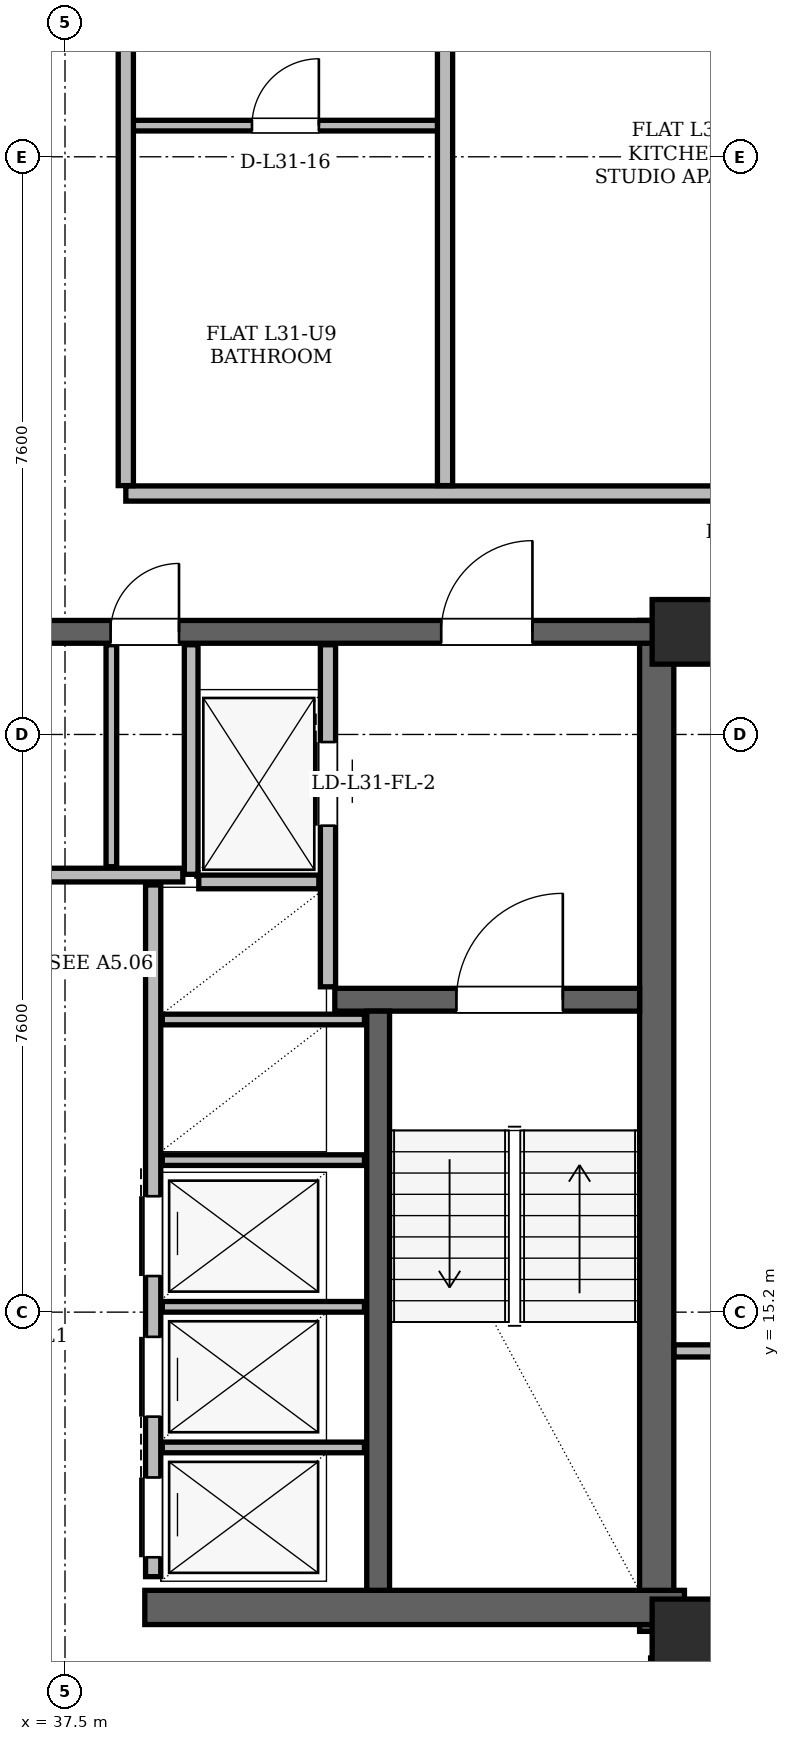
"""IFC4 building model, lengths in metres.
Left out: names, types, materials, properties, quantities, classifications, styles, units other than length and angle.
Written with IfcOpenShell. Run it as: python <this file> out.ifc"""

import sys

from ifc_helpers import new_model, si_unit, direction, frame, frame_2d, origin, origin_2d, place, context, subcontext, project, spatial, rectangle, hollow_rectangle, extrude, element, fill, save


model = new_model("IFC4")
c1 = context("Model", 3, precision=1e-05, world=origin(), true_north=direction((0.0, 1.0)))
c2 = subcontext(c1, "Body", "Model", "MODEL_VIEW")
j1 = project(units=[si_unit("LENGTHUNIT", "METRE"), si_unit("PLANEANGLEUNIT", "RADIAN")], contexts=[c1])
p1 = place(None, origin())
s1 = spatial("IfcSite", under=j1, at=p1, CompositionType="ELEMENT")
p2 = place(p1, origin())
s2 = spatial("IfcBuilding", under=s1, at=p2, CompositionType="ELEMENT")
p3 = place(p2, frame((0.0, 0.0, 119.4)))
s3 = spatial("IfcBuildingStorey", under=s2, at=p3, CompositionType="ELEMENT", Elevation=119.4)
for number, where, z_axis, x_axis in (
    (1, (45.65, 11.0, 0.0), (0.0, 0.0, 1.0), (1.0, 0.0, 0.0)),
    (2, (45.65, 24.15, 0.0), (0.0, 0.0, 1.0), (1.0, 0.0, 0.0)),
):
    element("IfcColumn", number, at=place(p3, frame(where, z_axis=z_axis, x_axis=x_axis)), inside=s3, PredefinedType="COLUMN", context=c2, shape_type="SweptSolid", body=[
        extrude(hollow_rectangle(XDim=0.85, YDim=0.85, WallThickness=0.07, at=origin_2d()), origin(), (0.0, 0.0, 1.0), 3.6),
    ])
p4 = place(p3, frame((45.285, 11.0, 0.0), z_axis=(0.0, 0.0, 1.0), x_axis=(0.0, 1.0, 0.0)))
e3 = element("IfcWall", 3, at=p4, inside=s3, PredefinedType="SHEAR", context=c2, shape_type="SweptSolid", body=[
    extrude(rectangle(XDim=13.3, YDim=0.45, at=frame_2d((6.65, 0.0))), origin(), (0.0, 0.0, 1.0), 3.36),
])
p5 = place(p3, frame((38.55, 11.315, 0.0), z_axis=(0.0, 0.0, 1.0), x_axis=(1.0, 0.0, 0.0)))
e4 = element("IfcWall", 4, at=p5, inside=s3, PredefinedType="SHEAR", context=c2, shape_type="SweptSolid", body=[
    extrude(rectangle(XDim=7.1, YDim=0.45, at=frame_2d((3.55, 0.0))), origin(), (0.0, 0.0, 1.0), 3.36),
])
p6 = place(p3, frame((29.65, 24.15, 0.0), z_axis=(0.0, 0.0, 1.0), x_axis=(1.0, 0.0, 0.0)))
e5 = element("IfcWall", 5, at=p6, inside=s3, PredefinedType="SHEAR", context=c2, shape_type="SweptSolid", body=[
    extrude(rectangle(XDim=15.7, YDim=0.3, at=frame_2d((7.85, 0.0))), origin(), (0.0, 0.0, 1.0), 3.36),
])
p7 = place(p6, frame((1.7, 0.0, 0.0)))
e6 = element("IfcOpeningElement", 6, at=p7, cuts=e5, PredefinedType="OPENING", context=c2, shape_type="SweptSolid", body=[
    extrude(rectangle(XDim=1.2, YDim=2.2, at=frame_2d((0.6, 1.1))), frame((0.0, 0.15, 0.0), z_axis=(0.0, -1.0, 0.0), x_axis=(1.0, 0.0, 0.0)), (0.0, 0.0, 1.0), 0.3),
])
p8 = place(p6, frame((12.8, 0.0, 0.0)))
e7 = element("IfcOpeningElement", 7, at=p8, cuts=e5, PredefinedType="OPENING", context=c2, shape_type="SweptSolid", body=[
    extrude(rectangle(XDim=1.2, YDim=2.2, at=frame_2d((0.6, 1.1))), frame((0.0, 0.15, 0.0), z_axis=(0.0, -1.0, 0.0), x_axis=(1.0, 0.0, 0.0)), (0.0, 0.0, 1.0), 0.3),
])
p9 = place(p6, frame((6.55, 0.0, 0.0)))
e8 = element("IfcOpeningElement", 8, at=p9, cuts=e5, PredefinedType="OPENING", context=c2, shape_type="SweptSolid", body=[
    extrude(rectangle(XDim=0.9, YDim=2.05, at=frame_2d((0.45, 1.025))), frame((0.0, 0.15, 0.0), z_axis=(0.0, -1.0, 0.0), x_axis=(1.0, 0.0, 0.0)), (0.0, 0.0, 1.0), 0.3),
])
p10 = place(p6, frame((8.45, 0.0, 0.0)))
e9 = element("IfcOpeningElement", 9, at=p10, cuts=e5, PredefinedType="OPENING", context=c2, shape_type="SweptSolid", body=[
    extrude(rectangle(XDim=0.9, YDim=2.05, at=frame_2d((0.45, 1.025))), frame((0.0, 0.15, 0.0), z_axis=(0.0, -1.0, 0.0), x_axis=(1.0, 0.0, 0.0)), (0.0, 0.0, 1.0), 0.3),
])
p11 = place(p3, frame((41.05, 19.31, 0.0), z_axis=(0.0, 0.0, 1.0), x_axis=(1.0, 0.0, 0.0)))
e10 = element("IfcWall", 10, at=p11, inside=s3, PredefinedType="SHEAR", context=c2, shape_type="SweptSolid", body=[
    extrude(rectangle(XDim=4.01, YDim=0.3, at=frame_2d((2.005, 0.0))), origin(), (0.0, 0.0, 1.0), 3.36),
])
p12 = place(p11, frame((1.6, 0.0, 0.0)))
e11 = element("IfcOpeningElement", 11, at=p12, cuts=e10, PredefinedType="OPENING", context=c2, shape_type="SweptSolid", body=[
    extrude(rectangle(XDim=1.4, YDim=2.2, at=frame_2d((0.7, 1.1))), frame((0.0, 0.15, 0.0), z_axis=(0.0, -1.0, 0.0), x_axis=(1.0, 0.0, 0.0)), (0.0, 0.0, 1.0), 0.3),
])
p13 = place(p3, frame((41.62, 11.54, 0.0), z_axis=(0.0, 0.0, 1.0), x_axis=(0.0, 1.0, 0.0)))
e12 = element("IfcWall", 12, at=p13, inside=s3, PredefinedType="SHEAR", context=c2, shape_type="SweptSolid", body=[
    extrude(rectangle(XDim=7.62, YDim=0.3, at=frame_2d((3.81, 0.0))), origin(), (0.0, 0.0, 1.0), 3.36),
])
p14 = place(p3, frame((60.417, 13.181, 0.0), z_axis=(0.0, 0.0, 1.0), x_axis=(-0.499998569178, 0.866026229868, 0.0)))
e13 = element("IfcWall", 13, at=p14, inside=s3, PredefinedType="SOLIDWALL", context=c2, shape_type="SweptSolid", body=[
    extrude(rectangle(XDim=34.901, YDim=0.34, at=frame_2d((17.451, 0.0))), origin(), (0.0, 0.0, 1.0), 2.578),
])
p15 = place(p14, frame((6.369, 0.0, 0.0)))
e14 = element("IfcOpeningElement", 14, at=p15, cuts=e13, PredefinedType="OPENING", context=c2, shape_type="SweptSolid", body=[
    extrude(rectangle(XDim=1.5, YDim=2.2, at=frame_2d((0.75, 1.1))), frame((0.0, 0.17, 0.0), z_axis=(0.0, -1.0, 0.0), x_axis=(1.0, 0.0, 0.0)), (0.0, 0.0, 1.0), 0.34),
])
p16 = place(p14, frame((25.367, 0.0, 0.0)))
e15 = element("IfcOpeningElement", 15, at=p16, cuts=e13, PredefinedType="OPENING", context=c2, shape_type="SweptSolid", body=[
    extrude(rectangle(XDim=1.5, YDim=2.2, at=frame_2d((0.75, 1.1))), frame((0.0, 0.17, 0.0), z_axis=(0.0, -1.0, 0.0), x_axis=(1.0, 0.0, 0.0)), (0.0, 0.0, 1.0), 0.34),
])
p17 = place(p14, frame((3.309, 0.0, 0.85)))
e16 = element("IfcOpeningElement", 16, at=p17, cuts=e13, PredefinedType="OPENING", context=c2, shape_type="SweptSolid", body=[
    extrude(rectangle(XDim=1.2, YDim=1.48, at=frame_2d((0.6, 0.74))), frame((0.0, 0.17, 0.0), z_axis=(0.0, -1.0, 0.0), x_axis=(1.0, 0.0, 0.0)), (0.0, 0.0, 1.0), 0.34),
])
p18 = place(p14, frame((11.346, 0.0, 0.85)))
e17 = element("IfcOpeningElement", 17, at=p18, cuts=e13, PredefinedType="OPENING", context=c2, shape_type="SweptSolid", body=[
    extrude(rectangle(XDim=1.2, YDim=1.48, at=frame_2d((0.6, 0.74))), frame((0.0, 0.17, 0.0), z_axis=(0.0, -1.0, 0.0), x_axis=(1.0, 0.0, 0.0)), (0.0, 0.0, 1.0), 0.34),
])
p19 = place(p14, frame((32.719, 0.0, 0.85)))
e18 = element("IfcOpeningElement", 18, at=p19, cuts=e13, PredefinedType="OPENING", context=c2, shape_type="SweptSolid", body=[
    extrude(rectangle(XDim=1.2, YDim=1.48, at=frame_2d((0.6, 0.74))), frame((0.0, 0.17, 0.0), z_axis=(0.0, -1.0, 0.0), x_axis=(1.0, 0.0, 0.0)), (0.0, 0.0, 1.0), 0.34),
])
p20 = place(p14, frame((14.549, 0.0, 0.85)))
e19 = element("IfcOpeningElement", 19, at=p20, cuts=e13, PredefinedType="OPENING", context=c2, shape_type="SweptSolid", body=[
    extrude(rectangle(XDim=2.5, YDim=1.618, at=frame_2d((1.25, 0.809))), frame((0.0, 0.17, 0.0), z_axis=(0.0, -1.0, 0.0), x_axis=(1.0, 0.0, 0.0)), (0.0, 0.0, 1.0), 0.34),
])
p21 = place(p14, frame((20.967, 0.0, 0.85)))
e20 = element("IfcOpeningElement", 20, at=p21, cuts=e13, PredefinedType="OPENING", context=c2, shape_type="SweptSolid", body=[
    extrude(rectangle(XDim=2.4, YDim=1.618, at=frame_2d((1.2, 0.809))), frame((0.0, 0.17, 0.0), z_axis=(0.0, -1.0, 0.0), x_axis=(1.0, 0.0, 0.0)), (0.0, 0.0, 1.0), 0.34),
])
p22 = place(p14, frame((30.927, 0.0, 0.85)))
e21 = element("IfcOpeningElement", 21, at=p22, cuts=e13, PredefinedType="OPENING", context=c2, shape_type="SweptSolid", body=[
    extrude(rectangle(XDim=1.2, YDim=1.48, at=frame_2d((0.6, 0.74))), frame((0.0, 0.17, 0.0), z_axis=(0.0, -1.0, 0.0), x_axis=(1.0, 0.0, 0.0)), (0.0, 0.0, 1.0), 0.34),
])
p23 = place(p3, frame((40.96, 19.48, 0.0), z_axis=(0.0, 0.0, 1.0), x_axis=(0.0, 1.0, 0.0)))
e22 = element("IfcWall", 22, at=p23, inside=s3, PredefinedType="PARTITIONING", context=c2, shape_type="SweptSolid", body=[
    extrude(rectangle(XDim=4.5, YDim=0.2, at=frame_2d((2.25, 0.0))), origin(), (0.0, 0.0, 1.0), 2.4),
])
p24 = place(p23, frame((2.12, 0.0, 0.0)))
e23 = element("IfcOpeningElement", 23, at=p24, cuts=e22, PredefinedType="OPENING", context=c2, shape_type="SweptSolid", body=[
    extrude(rectangle(XDim=1.1, YDim=2.2, at=frame_2d((0.55, 1.1))), frame((0.0, 0.1, 0.0), z_axis=(0.0, -1.0, 0.0), x_axis=(1.0, 0.0, 0.0)), (0.0, 0.0, 1.0), 0.2),
])
p25 = place(p3, frame((39.16, 20.96, 0.0), z_axis=(0.0, 0.0, 1.0), x_axis=(0.0, 1.0, 0.0)))
e24 = element("IfcWall", 24, at=p25, inside=s3, PredefinedType="PARTITIONING", context=c2, shape_type="SweptSolid", body=[
    extrude(rectangle(XDim=3.02, YDim=0.18, at=frame_2d((1.51, 0.0))), origin(), (0.0, 0.0, 1.0), 2.4),
])
p26 = place(p3, frame((39.26, 20.86, 0.0), z_axis=(0.0, 0.0, 1.0), x_axis=(1.0, 0.0, 0.0)))
e25 = element("IfcWall", 25, at=p26, inside=s3, PredefinedType="PARTITIONING", context=c2, shape_type="SweptSolid", body=[
    extrude(rectangle(XDim=1.58, YDim=0.18, at=frame_2d((0.79, 0.0))), origin(), (0.0, 0.0, 1.0), 3.36),
])
p27 = place(p3, frame((38.66, 11.72, 0.0), z_axis=(0.0, 0.0, 1.0), x_axis=(0.0, 1.0, 0.0)))
e26 = element("IfcWall", 26, at=p27, inside=s3, PredefinedType="PARTITIONING", context=c2, shape_type="SweptSolid", body=[
    extrude(rectangle(XDim=9.1, YDim=0.2, at=frame_2d((4.55, 0.0))), origin(), (0.0, 0.0, 1.0), 3.36),
])
p28 = place(p27, frame((0.255, 0.0, 0.0)))
e27 = element("IfcOpeningElement", 27, at=p28, cuts=e26, PredefinedType="OPENING", context=c2, shape_type="SweptSolid", body=[
    extrude(rectangle(XDim=1.05, YDim=2.15, at=frame_2d((0.525, 1.075))), frame((0.0, 0.1, 0.0), z_axis=(0.0, -1.0, 0.0), x_axis=(1.0, 0.0, 0.0)), (0.0, 0.0, 1.0), 0.2),
])
p29 = place(p27, frame((2.105, 0.0, 0.0)))
e28 = element("IfcOpeningElement", 28, at=p29, cuts=e26, PredefinedType="OPENING", context=c2, shape_type="SweptSolid", body=[
    extrude(rectangle(XDim=1.05, YDim=2.15, at=frame_2d((0.525, 1.075))), frame((0.0, 0.1, 0.0), z_axis=(0.0, -1.0, 0.0), x_axis=(1.0, 0.0, 0.0)), (0.0, 0.0, 1.0), 0.2),
])
p30 = place(p27, frame((3.955, 0.0, 0.0)))
e29 = element("IfcOpeningElement", 29, at=p30, cuts=e26, PredefinedType="OPENING", context=c2, shape_type="SweptSolid", body=[
    extrude(rectangle(XDim=1.05, YDim=2.15, at=frame_2d((0.525, 1.075))), frame((0.0, 0.1, 0.0), z_axis=(0.0, -1.0, 0.0), x_axis=(1.0, 0.0, 0.0)), (0.0, 0.0, 1.0), 0.2),
])
for number, where, z_axis, x_axis in (
    (30, (38.78, 13.42, 0.0), (0.0, 0.0, 1.0), (1.0, 0.0, 0.0)),
    (31, (38.78, 15.27, 0.0), (0.0, 0.0, 1.0), (1.0, 0.0, 0.0)),
    (32, (38.78, 17.2, 0.0), (0.0, 0.0, 1.0), (1.0, 0.0, 0.0)),
    (33, (38.78, 19.05, 0.0), (0.0, 0.0, 1.0), (1.0, 0.0, 0.0)),
):
    element("IfcWall", number, at=place(p3, frame(where, z_axis=z_axis, x_axis=x_axis)), inside=s3, PredefinedType="PARTITIONING", context=c2, shape_type="SweptSolid", body=[
        extrude(rectangle(XDim=2.66, YDim=0.14, at=frame_2d((1.33, 0.0))), origin(), (0.0, 0.0, 1.0), 3.36),
    ])
p31 = place(p3, frame((35.95, 20.95, 0.0), z_axis=(0.0, 0.0, 1.0), x_axis=(1.0, 0.0, 0.0)))
e34 = element("IfcWall", 34, at=p31, inside=s3, PredefinedType="PARTITIONING", context=c2, shape_type="SweptSolid", body=[
    extrude(rectangle(XDim=3.1, YDim=0.18, at=frame_2d((1.55, 0.0))), origin(), (0.0, 0.0, 1.0), 3.36),
])
p32 = place(p3, frame((38.11, 21.06, 0.0), z_axis=(0.0, 0.0, 1.0), x_axis=(0.0, 1.0, 0.0)))
e35 = element("IfcWall", 35, at=p32, inside=s3, PredefinedType="PARTITIONING", context=c2, shape_type="SweptSolid", body=[
    extrude(rectangle(XDim=2.92, YDim=0.14, at=frame_2d((1.46, 0.0))), origin(), (0.0, 0.0, 1.0), 2.4),
])
p33 = place(p3, frame((45.205, 10.55, 0.0), z_axis=(0.0, 0.0, 1.0), x_axis=(1.0, 0.0, 0.0)))
e36 = element("IfcWall", 36, at=p33, inside=s3, PredefinedType="PARTITIONING", context=c2, shape_type="SweptSolid", body=[
    extrude(rectangle(XDim=0.89, YDim=0.2, at=frame_2d((0.445, 0.0))), origin(), (0.0, 0.0, 1.0), 3.36),
])
p34 = place(p3, frame((45.514, 14.69, 0.0), z_axis=(0.0, 0.0, 1.0), x_axis=(1.0, 0.0, 0.0)))
e37 = element("IfcWall", 37, at=p34, inside=s3, PredefinedType="PARTITIONING", context=c2, shape_type="SweptSolid", body=[
    extrude(rectangle(XDim=13.831, YDim=0.16, at=frame_2d((6.915, 0.0))), origin(), (0.0, 0.0, 1.0), 2.4),
])
p35 = place(p34, frame((4.235, 0.0, 0.0)))
e38 = element("IfcOpeningElement", 38, at=p35, cuts=e37, PredefinedType="OPENING", context=c2, shape_type="SweptSolid", body=[
    extrude(rectangle(XDim=0.92, YDim=2.12, at=frame_2d((0.46, 1.06))), frame((0.0, 0.08, 0.0), z_axis=(0.0, -1.0, 0.0), x_axis=(1.0, 0.0, 0.0)), (0.0, 0.0, 1.0), 0.16),
])
p36 = place(p34, frame((10.195, 0.0, 0.0)))
e39 = element("IfcOpeningElement", 39, at=p36, cuts=e37, PredefinedType="OPENING", context=c2, shape_type="SweptSolid", body=[
    extrude(rectangle(XDim=0.95, YDim=2.1, at=frame_2d((0.475, 1.05))), frame((0.0, 0.08, 0.0), z_axis=(0.0, -1.0, 0.0), x_axis=(1.0, 0.0, 0.0)), (0.0, 0.0, 1.0), 0.16),
])
p37 = place(p34, frame((12.486, 0.0, 0.0)))
e40 = element("IfcOpeningElement", 40, at=p37, cuts=e37, PredefinedType="OPENING", context=c2, shape_type="SweptSolid", body=[
    extrude(rectangle(XDim=0.88, YDim=2.08, at=frame_2d((0.44, 1.04))), frame((0.0, 0.08, 0.0), z_axis=(0.0, -1.0, 0.0), x_axis=(1.0, 0.0, 0.0)), (0.0, 0.0, 1.0), 0.16),
])
p38 = place(p3, frame((38.3, 25.97, 0.0), z_axis=(0.0, 0.0, 1.0), x_axis=(1.0, 0.0, 0.0)))
e41 = element("IfcWall", 41, at=p38, inside=s3, PredefinedType="PARTITIONING", context=c2, shape_type="SweptSolid", body=[
    extrude(rectangle(XDim=11.7, YDim=0.2, at=frame_2d((5.85, 0.0))), origin(), (0.0, 0.0, 1.0), 2.814),
])
p39 = place(p38, frame((7.727, 0.0, 0.0)))
e42 = element("IfcOpeningElement", 42, at=p39, cuts=e41, PredefinedType="OPENING", context=c2, shape_type="SweptSolid", body=[
    extrude(rectangle(XDim=1.0, YDim=2.18, at=frame_2d((0.5, 1.09))), frame((0.0, 0.1, 0.0), z_axis=(0.0, -1.0, 0.0), x_axis=(1.0, 0.0, 0.0)), (0.0, 0.0, 1.0), 0.2),
])
p40 = place(p3, frame((38.218, 30.81, 0.0), z_axis=(0.0, 0.0, 1.0), x_axis=(1.0, 0.0, 0.0)))
e43 = element("IfcWall", 43, at=p40, inside=s3, PredefinedType="PARTITIONING", context=c2, shape_type="SweptSolid", body=[
    extrude(rectangle(XDim=4.364, YDim=0.14, at=frame_2d((2.182, 0.0))), origin(), (0.0, 0.0, 1.0), 3.36),
])
p41 = place(p40, frame((1.742, 0.0, 0.0)))
e44 = element("IfcOpeningElement", 44, at=p41, cuts=e43, PredefinedType="OPENING", context=c2, shape_type="SweptSolid", body=[
    extrude(rectangle(XDim=0.88, YDim=2.08, at=frame_2d((0.44, 1.04))), frame((0.0, 0.07, 0.0), z_axis=(0.0, -1.0, 0.0), x_axis=(1.0, 0.0, 0.0)), (0.0, 0.0, 1.0), 0.14),
])
p42 = place(p3, frame((38.3, 26.074, 0.0), z_axis=(0.0, 0.0, 1.0), x_axis=(0.0, 1.0, 0.0)))
e45 = element("IfcWall", 45, at=p42, inside=s3, PredefinedType="PARTITIONING", context=c2, shape_type="SweptSolid", body=[
    extrude(rectangle(XDim=13.422, YDim=0.2, at=frame_2d((6.711, 0.0))), origin(), (0.0, 0.0, 1.0), 3.36),
])
p43 = place(p42, frame((8.536, 0.0, 0.0)))
e46 = element("IfcOpeningElement", 46, at=p43, cuts=e45, PredefinedType="OPENING", context=c2, shape_type="SweptSolid", body=[
    extrude(rectangle(XDim=1.0, YDim=2.18, at=frame_2d((0.5, 1.09))), frame((0.0, 0.1, 0.0), z_axis=(0.0, -1.0, 0.0), x_axis=(1.0, 0.0, 0.0)), (0.0, 0.0, 1.0), 0.2),
])
p44 = place(p3, frame((42.5, 26.074, 0.0), z_axis=(0.0, 0.0, 1.0), x_axis=(0.0, 1.0, 0.0)))
e47 = element("IfcWall", 47, at=p44, inside=s3, PredefinedType="PARTITIONING", context=c2, shape_type="SweptSolid", body=[
    extrude(rectangle(XDim=17.158, YDim=0.2, at=frame_2d((8.579, 0.0))), origin(), (0.0, 0.0, 1.0), 3.36),
])
p45 = place(p24, origin())
e48 = element("IfcDoor", 48, at=p45, inside=s3, OperationType="SLIDING_TO_RIGHT", PredefinedType="DOOR", context=c2, shape_type="SweptSolid", body=[
    extrude(rectangle(XDim=1.1, YDim=2.2, at=frame_2d((0.55, 1.1))), frame((0.0, 0.025, 0.0), z_axis=(0.0, -1.0, 0.0), x_axis=(1.0, 0.0, 0.0)), (0.0, 0.0, 1.0), 0.05),
])
fill(e23, e48)
p46 = place(p28, origin())
e49 = element("IfcDoor", 49, at=p46, inside=s3, OperationType="SLIDING_TO_RIGHT", PredefinedType="DOOR", context=c2, shape_type="SweptSolid", body=[
    extrude(rectangle(XDim=1.05, YDim=2.15, at=frame_2d((0.525, 1.075))), frame((0.0, 0.025, 0.0), z_axis=(0.0, -1.0, 0.0), x_axis=(1.0, 0.0, 0.0)), (0.0, 0.0, 1.0), 0.05),
])
fill(e27, e49)
p47 = place(p29, origin())
e50 = element("IfcDoor", 50, at=p47, inside=s3, OperationType="SLIDING_TO_LEFT", PredefinedType="DOOR", context=c2, shape_type="SweptSolid", body=[
    extrude(rectangle(XDim=1.05, YDim=2.15, at=frame_2d((0.525, 1.075))), frame((0.0, 0.025, 0.0), z_axis=(0.0, -1.0, 0.0), x_axis=(1.0, 0.0, 0.0)), (0.0, 0.0, 1.0), 0.05),
])
fill(e28, e50)
p48 = place(p30, origin())
e51 = element("IfcDoor", 51, at=p48, inside=s3, OperationType="SLIDING_TO_RIGHT", PredefinedType="DOOR", context=c2, shape_type="SweptSolid", body=[
    extrude(rectangle(XDim=1.05, YDim=2.15, at=frame_2d((0.525, 1.075))), frame((0.0, 0.025, 0.0), z_axis=(0.0, -1.0, 0.0), x_axis=(1.0, 0.0, 0.0)), (0.0, 0.0, 1.0), 0.05),
])
fill(e29, e51)
p49 = place(p12, origin())
e52 = element("IfcDoor", 52, at=p49, inside=s3, OperationType="SINGLE_SWING_RIGHT", PredefinedType="DOOR", context=c2, shape_type="SweptSolid", body=[
    extrude(rectangle(XDim=1.4, YDim=2.2, at=frame_2d((0.7, 1.1))), frame((0.0, 0.025, 0.0), z_axis=(0.0, -1.0, 0.0), x_axis=(1.0, 0.0, 0.0)), (0.0, 0.0, 1.0), 0.05),
])
fill(e11, e52)
p50 = place(p8, origin())
e53 = element("IfcDoor", 53, at=p50, inside=s3, OperationType="SINGLE_SWING_RIGHT", PredefinedType="DOOR", context=c2, shape_type="SweptSolid", body=[
    extrude(rectangle(XDim=1.2, YDim=2.2, at=frame_2d((0.6, 1.1))), frame((0.0, 0.025, 0.0), z_axis=(0.0, -1.0, 0.0), x_axis=(1.0, 0.0, 0.0)), (0.0, 0.0, 1.0), 0.05),
])
fill(e7, e53)
p51 = place(p10, origin())
e54 = element("IfcDoor", 54, at=p51, inside=s3, OperationType="SINGLE_SWING_RIGHT", PredefinedType="DOOR", context=c2, shape_type="SweptSolid", body=[
    extrude(rectangle(XDim=0.9, YDim=2.05, at=frame_2d((0.45, 1.025))), frame((0.0, 0.025, 0.0), z_axis=(0.0, -1.0, 0.0), x_axis=(1.0, 0.0, 0.0)), (0.0, 0.0, 1.0), 0.05),
])
fill(e9, e54)
p52 = place(p41, origin())
e55 = element("IfcDoor", 55, at=p52, inside=s3, OperationType="SINGLE_SWING_RIGHT", PredefinedType="DOOR", context=c2, shape_type="SweptSolid", body=[
    extrude(rectangle(XDim=0.88, YDim=2.08, at=frame_2d((0.44, 1.04))), frame((0.0, 0.025, 0.0), z_axis=(0.0, -1.0, 0.0), x_axis=(1.0, 0.0, 0.0)), (0.0, 0.0, 1.0), 0.05),
])
fill(e44, e55)
save(model, sys.argv[1])
